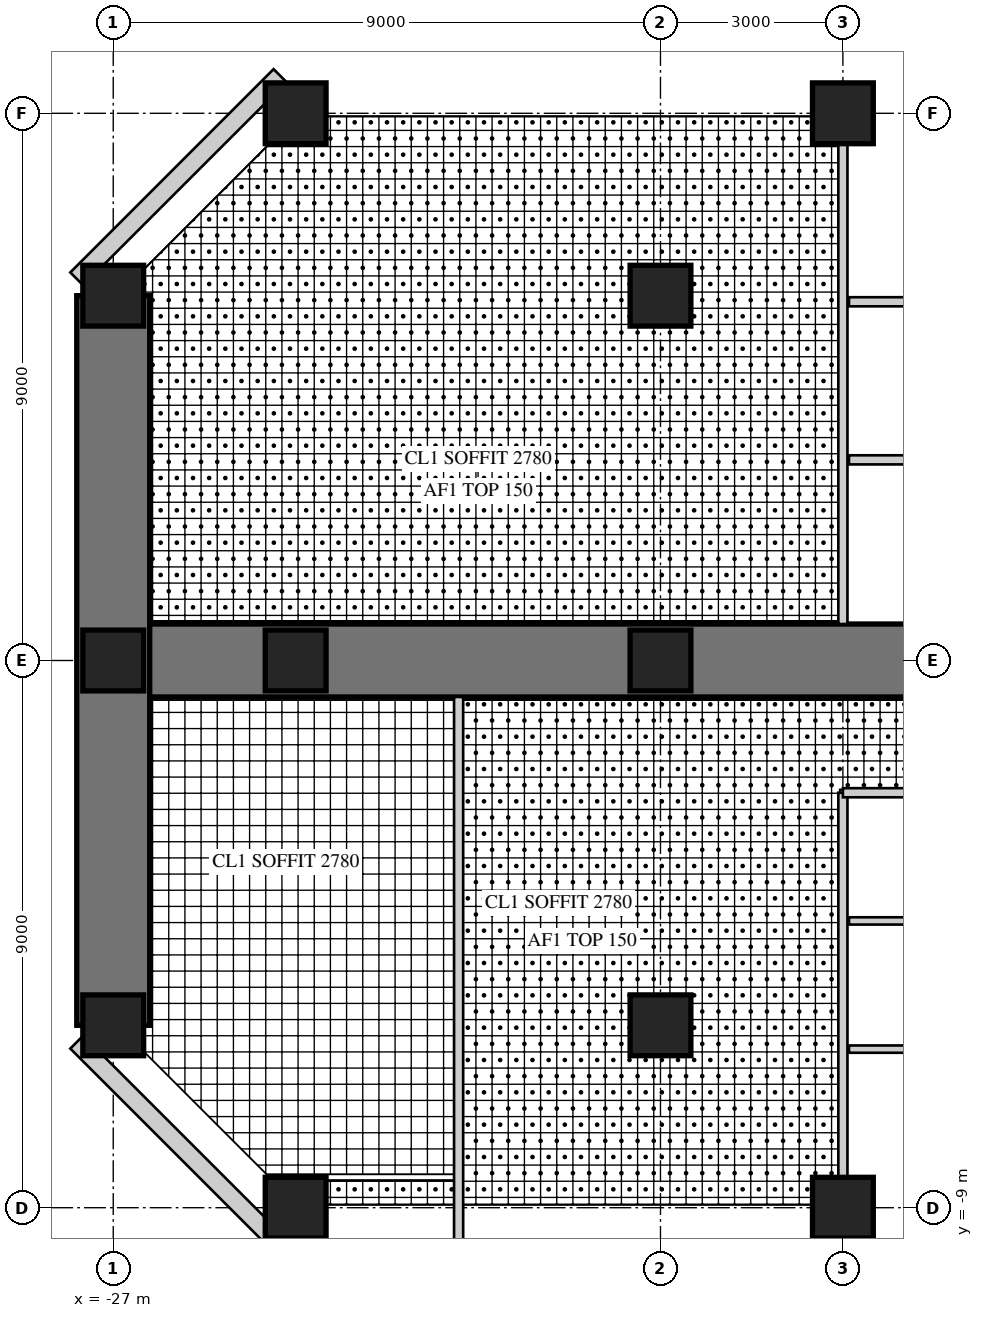
"""IFC4 building model, lengths in metres.
Left out: names, types, materials, properties, quantities, classifications, styles, units other than length and angle.
Written with IfcOpenShell. Run it as: python <this file> out.ifc"""

import sys

from ifc_helpers import new_model, si_unit, direction, frame, frame_2d, origin, origin_2d, place, context, subcontext, project, spatial, rectangle, hollow_rectangle, extrude, element, fill, save


model = new_model("IFC4")
c1 = context("Model", 3, precision=1e-05, world=origin(), true_north=direction((0.0, 1.0)))
c2 = subcontext(c1, "Body", "Model", "MODEL_VIEW")
j1 = project(units=[si_unit("LENGTHUNIT", "METRE"), si_unit("PLANEANGLEUNIT", "RADIAN")], contexts=[c1])
p1 = place(None, origin())
s1 = spatial("IfcSite", under=j1, at=p1, CompositionType="ELEMENT")
p2 = place(p1, origin())
s2 = spatial("IfcBuilding", under=s1, at=p2, CompositionType="ELEMENT")
p3 = place(p2, frame((0.0, 0.0, 104.5)))
s3 = spatial("IfcBuildingStorey", under=s2, at=p3, CompositionType="ELEMENT", Elevation=104.5)
p4 = place(p3, frame((-9.0, 0.0, 0.0), z_axis=(0.0, 0.0, 1.0), x_axis=(-1.0, 0.0, 0.0)))
e1 = element("IfcWall", 1, at=p4, inside=s3, PredefinedType="SHEAR", context=c2, shape_type="SweptSolid", body=[
    extrude(rectangle(XDim=18.0, YDim=1.2, at=frame_2d((9.0, 0.0))), origin(), (0.0, 0.0, 1.0), 4.0),
])
p5 = place(p4, frame((9.8, 0.0, 0.0)))
e2 = element("IfcOpeningElement", 2, at=p5, cuts=e1, PredefinedType="OPENING", context=c2, shape_type="SweptSolid", body=[
    extrude(rectangle(XDim=1.0, YDim=2.2, at=frame_2d((0.5, 1.1))), frame((0.0, 0.61, 0.0), z_axis=(0.0, -1.0, 0.0), x_axis=(1.0, 0.0, 0.0)), (0.0, 0.0, 1.0), 1.22),
])
p6 = place(p3, frame((-27.0, 6.0, 0.0), z_axis=(0.0, 0.0, 1.0), x_axis=(0.0, -1.0, 0.0)))
e3 = element("IfcWall", 3, at=p6, inside=s3, PredefinedType="SHEAR", context=c2, shape_type="SweptSolid", body=[
    extrude(rectangle(XDim=12.0, YDim=1.2, at=frame_2d((6.0, 0.0))), origin(), (0.0, 0.0, 1.0), 4.0),
])
p7 = place(p6, frame((1.55, 0.0, 0.6)))
e4 = element("IfcOpeningElement", 4, at=p7, cuts=e3, PredefinedType="OPENING", context=c2, shape_type="SweptSolid", body=[
    extrude(rectangle(XDim=3.0, YDim=2.4, at=frame_2d((1.5, 1.2))), frame((0.0, 0.61, 0.0), z_axis=(0.0, -1.0, 0.0), x_axis=(1.0, 0.0, 0.0)), (0.0, 0.0, 1.0), 1.22),
])
p8 = place(p6, frame((7.45, 0.0, 0.6)))
e5 = element("IfcOpeningElement", 5, at=p8, cuts=e3, PredefinedType="OPENING", context=c2, shape_type="SweptSolid", body=[
    extrude(rectangle(XDim=3.0, YDim=2.4, at=frame_2d((1.5, 1.2))), frame((0.0, 0.61, 0.0), z_axis=(0.0, -1.0, 0.0), x_axis=(1.0, 0.0, 0.0)), (0.0, 0.0, 1.0), 1.22),
])
for number, where, z_axis, x_axis in (
    (6, (-15.0, 9.0, 0.0), (0.0, 0.0, 1.0), (1.0, 0.0, 0.0)),
    (7, (-24.0, 9.0, 0.0), (0.0, 0.0, 1.0), (1.0, 0.0, 0.0)),
    (8, (-15.0, -9.0, 0.0), (0.0, 0.0, 1.0), (1.0, 0.0, 0.0)),
    (9, (-24.0, -9.0, 0.0), (0.0, 0.0, 1.0), (1.0, 0.0, 0.0)),
    (10, (-27.0, 6.0, 0.0), (0.0, 0.0, 1.0), (1.0, 0.0, 0.0)),
    (11, (-27.0, 0.0, 0.0), (0.0, 0.0, 1.0), (1.0, 0.0, 0.0)),
    (12, (-27.0, -6.0, 0.0), (0.0, 0.0, 1.0), (1.0, 0.0, 0.0)),
    (13, (-18.0, 6.0, 0.0), (0.0, 0.0, 1.0), (1.0, 0.0, 0.0)),
    (14, (-18.0, 0.0, 0.0), (0.0, 0.0, 1.0), (1.0, 0.0, 0.0)),
    (15, (-18.0, -6.0, 0.0), (0.0, 0.0, 1.0), (1.0, 0.0, 0.0)),
    (16, (-24.0, 0.0, 0.0), (0.0, 0.0, 1.0), (1.0, 0.0, 0.0)),
):
    element("IfcColumn", number, at=place(p3, frame(where, z_axis=z_axis, x_axis=x_axis)), inside=s3, PredefinedType="COLUMN", context=c2, shape_type="SweptSolid", body=[
        extrude(rectangle(XDim=1.0, YDim=1.0, at=origin_2d()), origin(), (0.0, 0.0, 1.0), 4.0),
    ])
p9 = place(p3, frame((-24.257, 9.62, 0.0), z_axis=(0.0, 0.0, 1.0), x_axis=(-0.707106781187, -0.707106781187, 0.0)))
e17 = element("IfcWall", 17, at=p9, inside=s3, PredefinedType="SOLIDWALL", context=c2, shape_type="SweptSolid", body=[
    extrude(rectangle(XDim=4.728, YDim=0.3, at=frame_2d((2.364, 0.0))), origin(), (0.0, 0.0, 1.0), 3.8),
])
p10 = place(p9, frame((1.914, 0.0, 0.3)))
e18 = element("IfcOpeningElement", 18, at=p10, cuts=e17, PredefinedType="OPENING", context=c2, shape_type="SweptSolid", body=[
    extrude(rectangle(XDim=0.9, YDim=2.4, at=frame_2d((0.45, 1.2))), frame((0.0, 0.16, 0.0), z_axis=(0.0, -1.0, 0.0), x_axis=(1.0, 0.0, 0.0)), (0.0, 0.0, 1.0), 0.32),
])
p11 = place(p3, frame((-27.6, -6.277, 0.0), z_axis=(0.0, 0.0, 1.0), x_axis=(0.707106781187, -0.707106781187, 0.0)))
e19 = element("IfcWall", 19, at=p11, inside=s3, PredefinedType="SOLIDWALL", context=c2, shape_type="SweptSolid", body=[
    extrude(rectangle(XDim=4.728, YDim=0.3, at=frame_2d((2.364, 0.0))), origin(), (0.0, 0.0, 1.0), 3.8),
])
p12 = place(p11, frame((1.914, 0.0, 0.3)))
e20 = element("IfcOpeningElement", 20, at=p12, cuts=e19, PredefinedType="OPENING", context=c2, shape_type="SweptSolid", body=[
    extrude(rectangle(XDim=0.9, YDim=2.4, at=frame_2d((0.45, 1.2))), frame((0.0, 0.16, 0.0), z_axis=(0.0, -1.0, 0.0), x_axis=(1.0, 0.0, 0.0)), (0.0, 0.0, 1.0), 0.32),
])
p13 = place(p3, frame((-15.0, -2.175, 0.0), z_axis=(0.0, 0.0, 1.0), x_axis=(0.0, -1.0, 0.0)))
e21 = element("IfcWall", 21, at=p13, inside=s3, PredefinedType="PARTITIONING", context=c2, shape_type="SweptSolid", body=[
    extrude(rectangle(XDim=6.325, YDim=0.15, at=frame_2d((3.163, 0.0))), origin(), (0.0, 0.0, 1.0), 3.0),
])
p14 = place(p13, frame((0.554, 0.0, 0.0)))
e22 = element("IfcOpeningElement", 22, at=p14, cuts=e21, PredefinedType="OPENING", context=c2, shape_type="SweptSolid", body=[
    extrude(rectangle(XDim=1.0, YDim=2.1, at=frame_2d((0.5, 1.05))), frame((0.0, 0.085, 0.0), z_axis=(0.0, -1.0, 0.0), x_axis=(1.0, 0.0, 0.0)), (0.0, 0.0, 1.0), 0.17),
])
p15 = place(p13, frame((2.663, 0.0, 0.0)))
e23 = element("IfcOpeningElement", 23, at=p15, cuts=e21, PredefinedType="OPENING", context=c2, shape_type="SweptSolid", body=[
    extrude(rectangle(XDim=1.0, YDim=2.1, at=frame_2d((0.5, 1.05))), frame((0.0, 0.085, 0.0), z_axis=(0.0, -1.0, 0.0), x_axis=(1.0, 0.0, 0.0)), (0.0, 0.0, 1.0), 0.17),
])
p16 = place(p13, frame((4.771, 0.0, 0.0)))
e24 = element("IfcOpeningElement", 24, at=p16, cuts=e21, PredefinedType="OPENING", context=c2, shape_type="SweptSolid", body=[
    extrude(rectangle(XDim=1.0, YDim=2.1, at=frame_2d((0.5, 1.05))), frame((0.0, 0.085, 0.0), z_axis=(0.0, -1.0, 0.0), x_axis=(1.0, 0.0, 0.0)), (0.0, 0.0, 1.0), 0.17),
])
p17 = place(p3, frame((-9.65, -2.175, 0.0), z_axis=(0.0, 0.0, 1.0), x_axis=(-1.0, 0.0, 0.0)))
e25 = element("IfcWall", 25, at=p17, inside=s3, PredefinedType="PARTITIONING", context=c2, shape_type="SweptSolid", body=[
    extrude(rectangle(XDim=5.35, YDim=0.15, at=frame_2d((2.675, 0.0))), origin(), (0.0, 0.0, 1.0), 3.8),
])
for number, where, z_axis, x_axis in (
    (26, (-9.65, -4.283, 0.0), (0.0, 0.0, 1.0), (-1.0, 0.0, 0.0)),
    (27, (-9.65, -6.392, 0.0), (0.0, 0.0, 1.0), (-1.0, 0.0, 0.0)),
):
    element("IfcWall", number, at=place(p3, frame(where, z_axis=z_axis, x_axis=x_axis)), inside=s3, PredefinedType="PLUMBINGWALL", context=c2, shape_type="SweptSolid", body=[
        extrude(rectangle(XDim=5.25, YDim=0.12, at=frame_2d((2.625, 0.0))), origin(), (0.0, 0.0, 1.0), 3.8),
    ])
p18 = place(p3, frame((-15.0, 8.5, 0.0), z_axis=(0.0, 0.0, 1.0), x_axis=(0.0, -1.0, 0.0)))
e28 = element("IfcWall", 28, at=p18, inside=s3, PredefinedType="PARTITIONING", context=c2, shape_type="SweptSolid", body=[
    extrude(rectangle(XDim=7.9, YDim=0.15, at=frame_2d((3.95, 0.0))), origin(), (0.0, 0.0, 1.0), 3.0),
])
p19 = place(p18, frame((0.8, 0.0, 0.0)))
e29 = element("IfcOpeningElement", 29, at=p19, cuts=e28, PredefinedType="OPENING", context=c2, shape_type="SweptSolid", body=[
    extrude(rectangle(XDim=1.0, YDim=2.1, at=frame_2d((0.5, 1.05))), frame((0.0, 0.085, 0.0), z_axis=(0.0, -1.0, 0.0), x_axis=(1.0, 0.0, 0.0)), (0.0, 0.0, 1.0), 0.17),
])
p20 = place(p18, frame((3.4, 0.0, 0.0)))
e30 = element("IfcOpeningElement", 30, at=p20, cuts=e28, PredefinedType="OPENING", context=c2, shape_type="SweptSolid", body=[
    extrude(rectangle(XDim=1.0, YDim=2.1, at=frame_2d((0.5, 1.05))), frame((0.0, 0.085, 0.0), z_axis=(0.0, -1.0, 0.0), x_axis=(1.0, 0.0, 0.0)), (0.0, 0.0, 1.0), 0.17),
])
p21 = place(p18, frame((6.05, 0.0, 0.0)))
e31 = element("IfcOpeningElement", 31, at=p21, cuts=e28, PredefinedType="OPENING", context=c2, shape_type="SweptSolid", body=[
    extrude(rectangle(XDim=1.0, YDim=2.1, at=frame_2d((0.5, 1.05))), frame((0.0, 0.085, 0.0), z_axis=(0.0, -1.0, 0.0), x_axis=(1.0, 0.0, 0.0)), (0.0, 0.0, 1.0), 0.17),
])
p22 = place(p3, frame((-9.65, 3.3, 0.0), z_axis=(0.0, 0.0, 1.0), x_axis=(-1.0, 0.0, 0.0)))
e32 = element("IfcWall", 32, at=p22, inside=s3, PredefinedType="PARTITIONING", context=c2, shape_type="SweptSolid", body=[
    extrude(rectangle(XDim=5.25, YDim=0.15, at=frame_2d((2.625, 0.0))), origin(), (0.0, 0.0, 1.0), 3.8),
])
p23 = place(p3, frame((-9.65, 5.9, 0.0), z_axis=(0.0, 0.0, 1.0), x_axis=(-1.0, 0.0, 0.0)))
e33 = element("IfcWall", 33, at=p23, inside=s3, PredefinedType="PARTITIONING", context=c2, shape_type="SweptSolid", body=[
    extrude(rectangle(XDim=5.25, YDim=0.15, at=frame_2d((2.625, 0.0))), origin(), (0.0, 0.0, 1.0), 3.1),
])
p24 = place(p3, frame((-21.32, -0.6, 0.0), z_axis=(0.0, 0.0, 1.0), x_axis=(0.0, -1.0, 0.0)))
e34 = element("IfcWall", 34, at=p24, inside=s3, PredefinedType="PARTITIONING", context=c2, shape_type="SweptSolid", body=[
    extrude(rectangle(XDim=8.98, YDim=0.15, at=frame_2d((4.49, 0.0))), origin(), (0.0, 0.0, 1.0), 3.8),
])
p25 = place(p24, frame((0.45, 0.0, 0.0)))
e35 = element("IfcOpeningElement", 35, at=p25, cuts=e34, PredefinedType="OPENING", context=c2, shape_type="SweptSolid", body=[
    extrude(rectangle(XDim=1.0, YDim=2.2, at=frame_2d((0.5, 1.1))), frame((0.0, 0.085, 0.0), z_axis=(0.0, -1.0, 0.0), x_axis=(1.0, 0.0, 0.0)), (0.0, 0.0, 1.0), 0.17),
])
p26 = place(p10, origin())
e36 = element("IfcWindow", 36, at=p26, inside=s3, PartitioningType="SINGLE_PANEL", PredefinedType="WINDOW", context=c2, shape_type="SweptSolid", body=[
    extrude(hollow_rectangle(XDim=0.9, YDim=2.4, WallThickness=0.06, at=frame_2d((0.45, 1.2))), frame((0.0, 0.03, 0.0), z_axis=(0.0, -1.0, 0.0), x_axis=(1.0, 0.0, 0.0)), (0.0, 0.0, 1.0), 0.06),
    extrude(rectangle(XDim=0.779, YDim=2.279, at=frame_2d((0.45, 1.2))), frame((0.0, 0.03, 0.0), z_axis=(0.0, -1.0, 0.0), x_axis=(1.0, 0.0, 0.0)), (0.0, 0.0, 1.0), 0.06),
])
fill(e18, e36)
p27 = place(p7, origin())
e37 = element("IfcWindow", 37, at=p27, inside=s3, PartitioningType="SINGLE_PANEL", PredefinedType="WINDOW", context=c2, shape_type="SweptSolid", body=[
    extrude(hollow_rectangle(XDim=3.0, YDim=2.4, WallThickness=0.06, at=frame_2d((1.5, 1.2))), frame((0.0, 0.03, 0.0), z_axis=(0.0, -1.0, 0.0), x_axis=(1.0, 0.0, 0.0)), (0.0, 0.0, 1.0), 0.06),
    extrude(rectangle(XDim=2.879, YDim=2.279, at=frame_2d((1.5, 1.2))), frame((0.0, 0.03, 0.0), z_axis=(0.0, -1.0, 0.0), x_axis=(1.0, 0.0, 0.0)), (0.0, 0.0, 1.0), 0.06),
])
fill(e4, e37)
p28 = place(p8, origin())
e38 = element("IfcWindow", 38, at=p28, inside=s3, PartitioningType="SINGLE_PANEL", PredefinedType="WINDOW", context=c2, shape_type="SweptSolid", body=[
    extrude(hollow_rectangle(XDim=3.0, YDim=2.4, WallThickness=0.06, at=frame_2d((1.5, 1.2))), frame((0.0, 0.03, 0.0), z_axis=(0.0, -1.0, 0.0), x_axis=(1.0, 0.0, 0.0)), (0.0, 0.0, 1.0), 0.06),
    extrude(rectangle(XDim=2.879, YDim=2.279, at=frame_2d((1.5, 1.2))), frame((0.0, 0.03, 0.0), z_axis=(0.0, -1.0, 0.0), x_axis=(1.0, 0.0, 0.0)), (0.0, 0.0, 1.0), 0.06),
])
fill(e5, e38)
p29 = place(p12, origin())
e39 = element("IfcWindow", 39, at=p29, inside=s3, PartitioningType="SINGLE_PANEL", PredefinedType="WINDOW", context=c2, shape_type="SweptSolid", body=[
    extrude(hollow_rectangle(XDim=0.9, YDim=2.4, WallThickness=0.06, at=frame_2d((0.45, 1.2))), frame((0.0, 0.03, 0.0), z_axis=(0.0, -1.0, 0.0), x_axis=(1.0, 0.0, 0.0)), (0.0, 0.0, 1.0), 0.06),
    extrude(rectangle(XDim=0.779, YDim=2.279, at=frame_2d((0.45, 1.2))), frame((0.0, 0.03, 0.0), z_axis=(0.0, -1.0, 0.0), x_axis=(1.0, 0.0, 0.0)), (0.0, 0.0, 1.0), 0.06),
])
fill(e20, e39)
p30 = place(p14, origin())
e40 = element("IfcDoor", 40, at=p30, inside=s3, OperationType="SINGLE_SWING_LEFT", PredefinedType="DOOR", context=c2, shape_type="SweptSolid", body=[
    extrude(rectangle(XDim=1.0, YDim=2.1, at=frame_2d((0.5, 1.05))), frame((0.0, 0.025, 0.0), z_axis=(0.0, -1.0, 0.0), x_axis=(1.0, 0.0, 0.0)), (0.0, 0.0, 1.0), 0.05),
])
fill(e22, e40)
p31 = place(p15, origin())
e41 = element("IfcDoor", 41, at=p31, inside=s3, OperationType="SINGLE_SWING_LEFT", PredefinedType="DOOR", context=c2, shape_type="SweptSolid", body=[
    extrude(rectangle(XDim=1.0, YDim=2.1, at=frame_2d((0.5, 1.05))), frame((0.0, 0.025, 0.0), z_axis=(0.0, -1.0, 0.0), x_axis=(1.0, 0.0, 0.0)), (0.0, 0.0, 1.0), 0.05),
])
fill(e23, e41)
p32 = place(p16, origin())
e42 = element("IfcDoor", 42, at=p32, inside=s3, OperationType="SINGLE_SWING_LEFT", PredefinedType="DOOR", context=c2, shape_type="SweptSolid", body=[
    extrude(rectangle(XDim=1.0, YDim=2.1, at=frame_2d((0.5, 1.05))), frame((0.0, 0.025, 0.0), z_axis=(0.0, -1.0, 0.0), x_axis=(1.0, 0.0, 0.0)), (0.0, 0.0, 1.0), 0.05),
])
fill(e24, e42)
p33 = place(p19, origin())
e43 = element("IfcDoor", 43, at=p33, inside=s3, OperationType="SINGLE_SWING_RIGHT", PredefinedType="DOOR", context=c2, shape_type="SweptSolid", body=[
    extrude(rectangle(XDim=1.0, YDim=2.1, at=frame_2d((0.5, 1.05))), frame((0.0, 0.025, 0.0), z_axis=(0.0, -1.0, 0.0), x_axis=(1.0, 0.0, 0.0)), (0.0, 0.0, 1.0), 0.05),
])
fill(e29, e43)
p34 = place(p20, origin())
e44 = element("IfcDoor", 44, at=p34, inside=s3, OperationType="SINGLE_SWING_LEFT", PredefinedType="DOOR", context=c2, shape_type="SweptSolid", body=[
    extrude(rectangle(XDim=1.0, YDim=2.1, at=frame_2d((0.5, 1.05))), frame((0.0, 0.025, 0.0), z_axis=(0.0, -1.0, 0.0), x_axis=(1.0, 0.0, 0.0)), (0.0, 0.0, 1.0), 0.05),
])
fill(e30, e44)
p35 = place(p21, origin())
e45 = element("IfcDoor", 45, at=p35, inside=s3, OperationType="SINGLE_SWING_LEFT", PredefinedType="DOOR", context=c2, shape_type="SweptSolid", body=[
    extrude(rectangle(XDim=1.0, YDim=2.1, at=frame_2d((0.5, 1.05))), frame((0.0, 0.025, 0.0), z_axis=(0.0, -1.0, 0.0), x_axis=(1.0, 0.0, 0.0)), (0.0, 0.0, 1.0), 0.05),
])
fill(e31, e45)
p36 = place(p25, frame((1.0, 0.0, 0.0), z_axis=(0.0, 0.0, 1.0), x_axis=(-1.0, 0.0, 0.0)))
e46 = element("IfcDoor", 46, at=p36, inside=s3, OperationType="SINGLE_SWING_RIGHT", PredefinedType="DOOR", context=c2, shape_type="SweptSolid", body=[
    extrude(rectangle(XDim=1.0, YDim=2.2, at=frame_2d((0.5, 1.1))), frame((0.0, 0.025, 0.0), z_axis=(0.0, -1.0, 0.0), x_axis=(1.0, 0.0, 0.0)), (0.0, 0.0, 1.0), 0.05),
])
fill(e35, e46)
p37 = place(p5, origin())
e47 = element("IfcDoor", 47, at=p37, inside=s3, OperationType="SINGLE_SWING_RIGHT", PredefinedType="DOOR", context=c2, shape_type="SweptSolid", body=[
    extrude(rectangle(XDim=1.0, YDim=2.2, at=frame_2d((0.5, 1.1))), frame((0.0, 0.025, 0.0), z_axis=(0.0, -1.0, 0.0), x_axis=(1.0, 0.0, 0.0)), (0.0, 0.0, 1.0), 0.05),
])
fill(e2, e47)
save(model, sys.argv[1])
